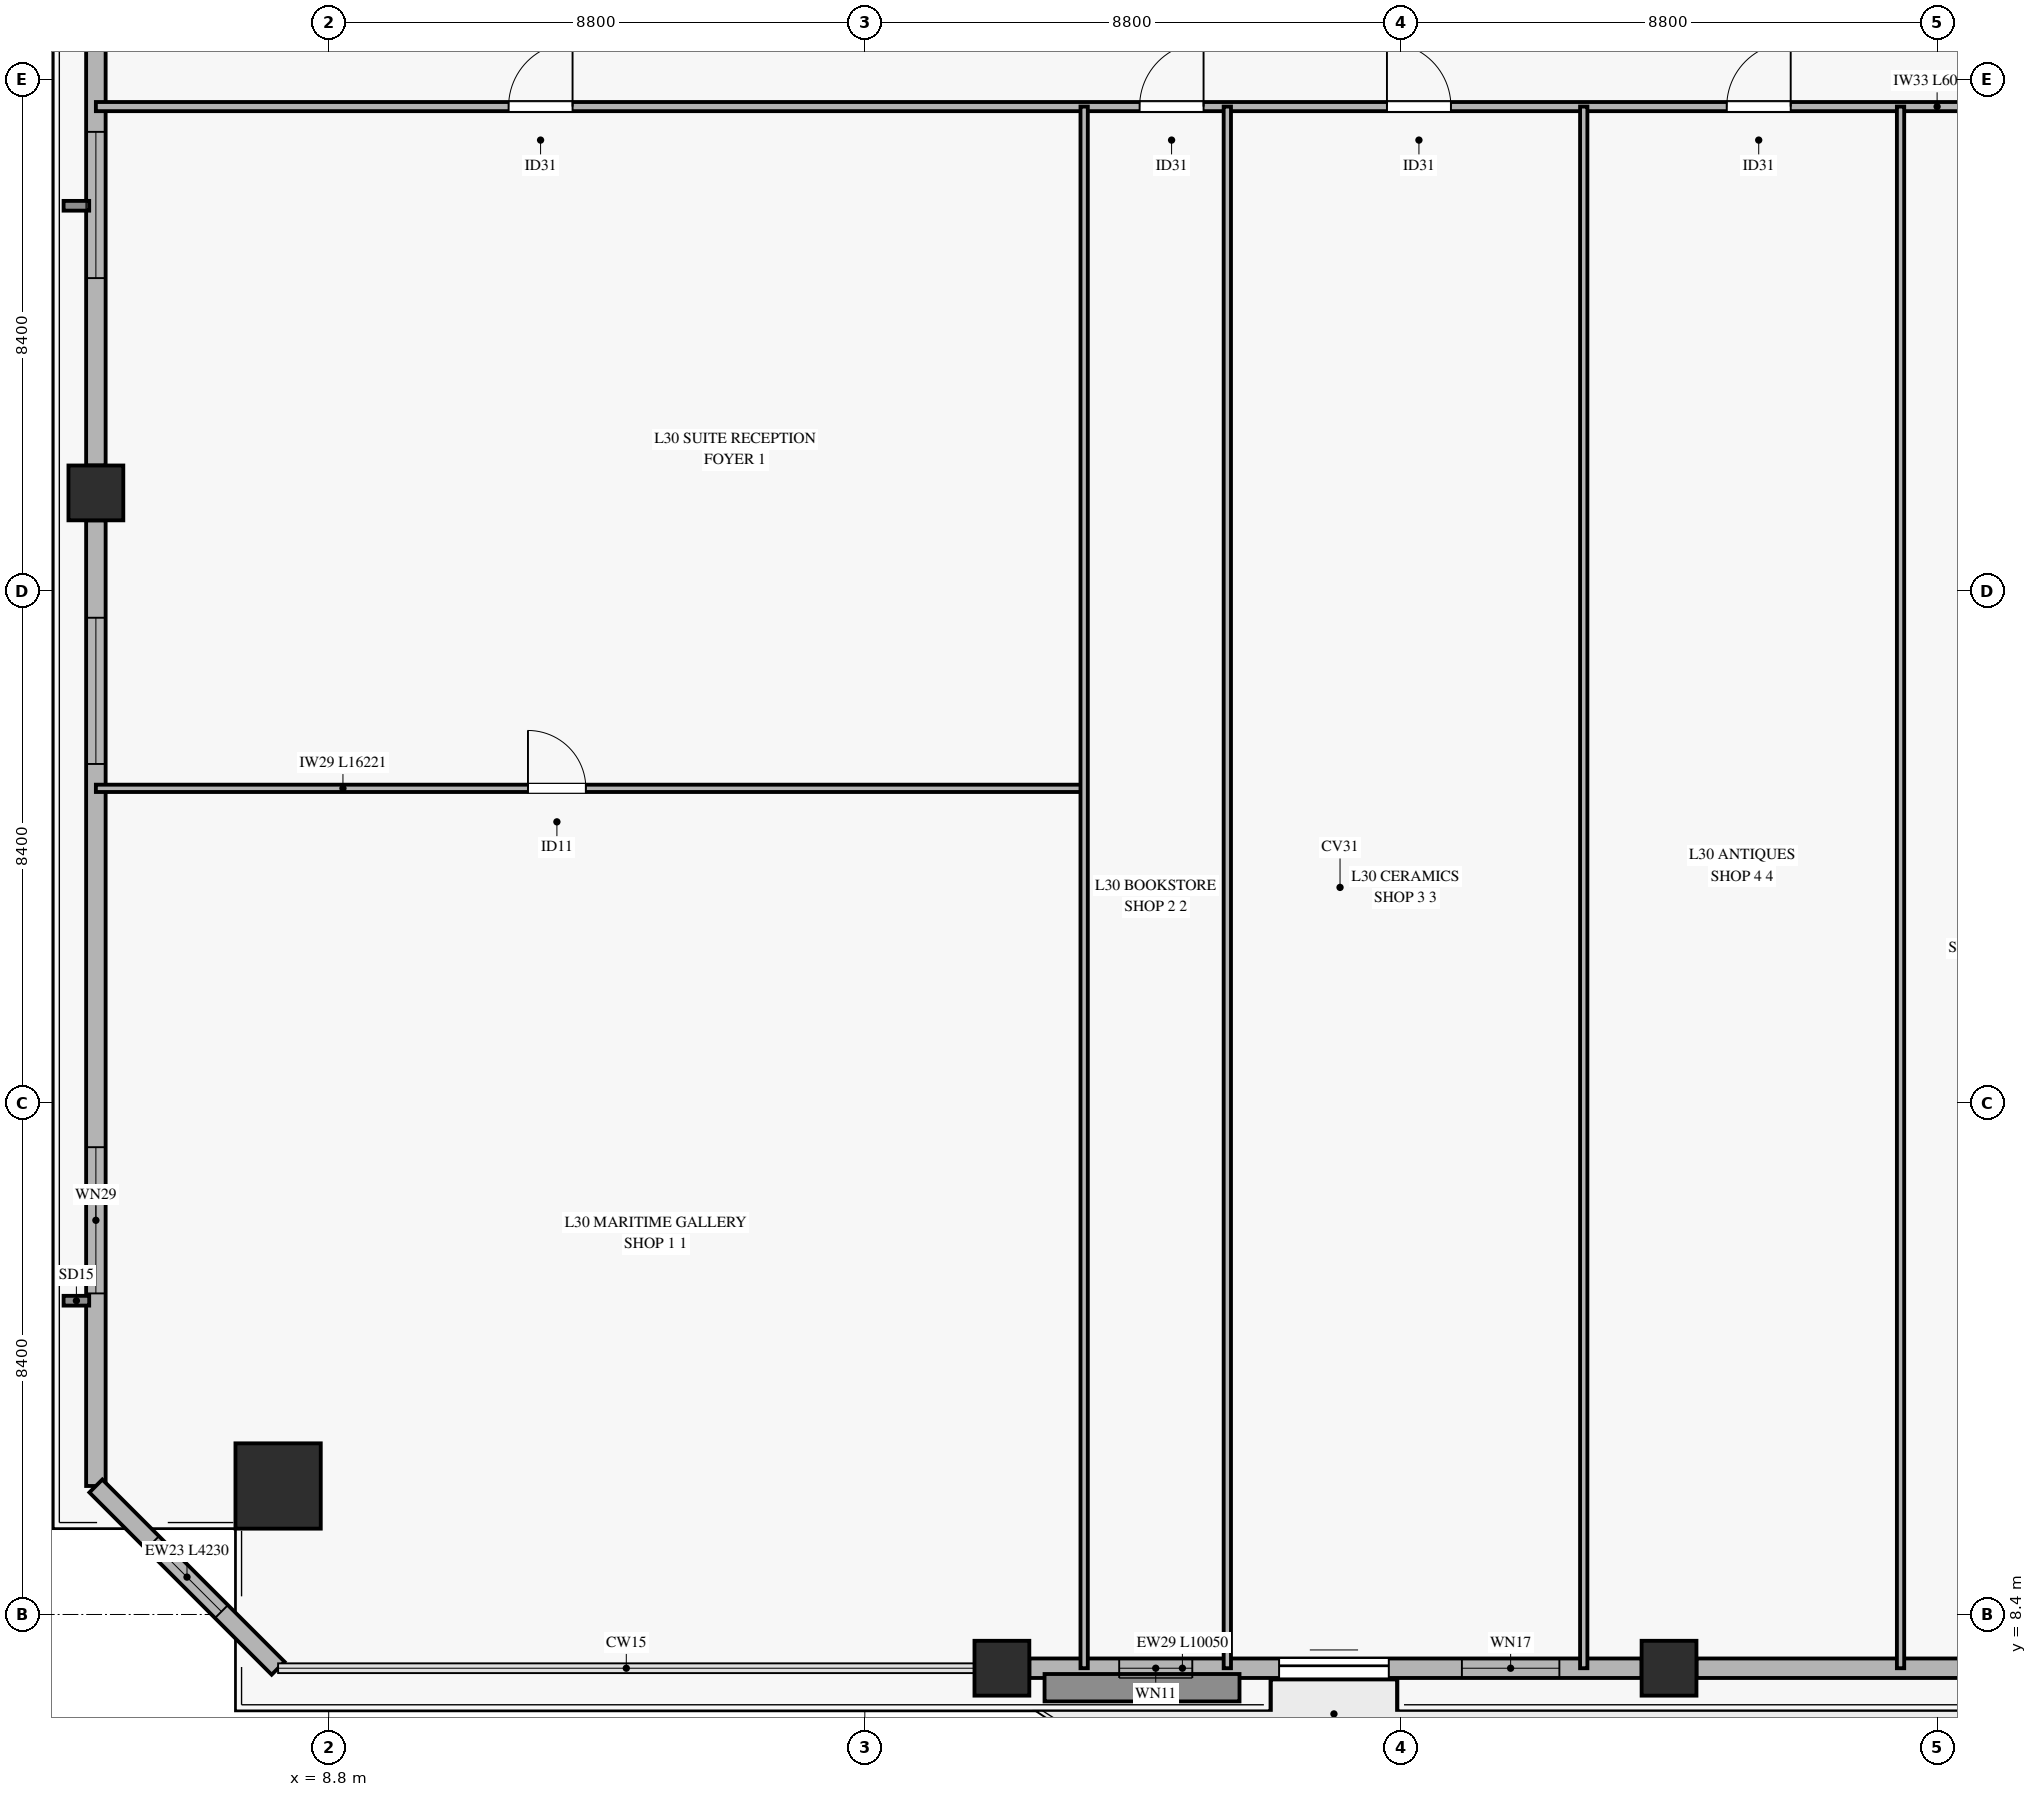
"""IFC4 building model, lengths in metres.
Left out: names, types, materials, properties, quantities, classifications, styles, units other than length and angle.
Written with IfcOpenShell. Run it as: python <this file> out.ifc"""

import sys

from ifc_helpers import new_model, si_unit, direction, frame, frame_2d, origin, origin_2d, place, context, subcontext, project, spatial, rectangle, hollow_rectangle, extrude, source, transform, mapped, element, fill, save


model = new_model("IFC4")
c1 = context("Model", 3, precision=1e-05, world=origin(), true_north=direction((0.0, 1.0)))
c2 = subcontext(c1, "Body", "Model", "MODEL_VIEW")
j1 = project(units=[si_unit("LENGTHUNIT", "METRE"), si_unit("PLANEANGLEUNIT", "RADIAN")], contexts=[c1])
p1 = place(None, origin())
s1 = spatial("IfcSite", under=j1, at=p1, CompositionType="ELEMENT")
p2 = place(p1, origin())
s2 = spatial("IfcBuilding", under=s1, at=p2, CompositionType="ELEMENT")
p3 = place(p2, frame((0.0, 0.0, 123.1)))
s3 = spatial("IfcBuildingStorey", under=s2, at=p3, CompositionType="ELEMENT", Elevation=123.1)
m1 = source(origin(), c2, "Body", "SweptSolid", [
    extrude(hollow_rectangle(XDim=1.4, YDim=1.4, WallThickness=0.065, at=origin_2d()), origin(), (0.0, 0.0, 1.0), 3.68),
])
p4 = place(p3, frame((7.97, 10.509, 0.0), z_axis=(0.0, 0.0, 1.0), x_axis=(1.0, 0.0, 0.0)))
e1 = element("IfcColumn", 1, at=p4, inside=s3, PredefinedType="COLUMN", context=c2, shape_type="MappedRepresentation", body=[
    mapped(m1, transform((0.0, 0.0, 0.0), x_axis=(1.0, 0.0, 0.0), y_axis=(0.0, 1.0, 0.0), z_axis=(0.0, 0.0, 1.0), scale=1.0)),
])
m2 = source(origin(), c2, "Body", "SweptSolid", [
    extrude(hollow_rectangle(XDim=0.9, YDim=0.9, WallThickness=0.04, at=origin_2d()), origin(), (0.0, 0.0, 1.0), 3.68),
])
for number, where, z_axis, x_axis in (
    (2, (19.85, 7.518, 0.0), (0.0, 0.0, 1.0), (1.0, 0.0, 0.0)),
    (3, (30.8, 7.518, 0.0), (0.0, 0.0, 1.0), (1.0, 0.0, 0.0)),
    (4, (4.979, 26.809, 0.0), (0.0, 0.0, 1.0), (1.0, 0.0, 0.0)),
):
    element("IfcColumn", number, at=place(p3, frame(where, z_axis=z_axis, x_axis=x_axis)), inside=s3, PredefinedType="COLUMN", context=c2, shape_type="MappedRepresentation", body=[
        mapped(m2, transform((0.0, 0.0, 0.0), x_axis=(1.0, 0.0, 0.0), y_axis=(0.0, 1.0, 0.0), z_axis=(0.0, 0.0, 1.0), scale=1.0)),
    ])
p5 = place(p3, frame((20.3, 7.518, 0.0), z_axis=(0.0, 0.0, 1.0), x_axis=(1.0, 0.0, 0.0)))
e5 = element("IfcWall", 5, at=p5, inside=s3, PredefinedType="SOLIDWALL", context=c2, shape_type="SweptSolid", body=[
    extrude(rectangle(XDim=10.05, YDim=0.32, at=frame_2d((5.025, 0.0))), origin(), (0.0, 0.0, 1.0), 3.16),
])
p6 = place(p5, frame((4.1, 0.0, 0.0)))
e6 = element("IfcOpeningElement", 6, at=p6, cuts=e5, PredefinedType="OPENING", context=c2, shape_type="SweptSolid", body=[
    extrude(rectangle(XDim=1.8, YDim=2.25, at=frame_2d((0.9, 1.125))), frame((0.0, 0.17, 0.0), z_axis=(0.0, -1.0, 0.0), x_axis=(1.0, 0.0, 0.0)), (0.0, 0.0, 1.0), 0.34),
])
p7 = place(p5, frame((1.475, 0.0, 0.45)))
e7 = element("IfcOpeningElement", 7, at=p7, cuts=e5, PredefinedType="OPENING", context=c2, shape_type="SweptSolid", body=[
    extrude(rectangle(XDim=1.2, YDim=2.0, at=frame_2d((0.6, 1.0))), frame((0.0, 0.17, 0.0), z_axis=(0.0, -1.0, 0.0), x_axis=(1.0, 0.0, 0.0)), (0.0, 0.0, 1.0), 0.34),
])
p8 = place(p5, frame((7.1, 0.0, 0.45)))
e8 = element("IfcOpeningElement", 8, at=p8, cuts=e5, PredefinedType="OPENING", context=c2, shape_type="SweptSolid", body=[
    extrude(rectangle(XDim=1.6, YDim=2.0, at=frame_2d((0.8, 1.0))), frame((0.0, 0.17, 0.0), z_axis=(0.0, -1.0, 0.0), x_axis=(1.0, 0.0, 0.0)), (0.0, 0.0, 1.0), 0.34),
])
p9 = place(p3, frame((31.25, 7.518, 0.0), z_axis=(0.0, 0.0, 1.0), x_axis=(1.0, 0.0, 0.0)))
e9 = element("IfcWall", 9, at=p9, inside=s3, PredefinedType="SOLIDWALL", context=c2, shape_type="SweptSolid", body=[
    extrude(rectangle(XDim=5.85, YDim=0.32, at=frame_2d((2.925, 0.0))), origin(), (0.0, 0.0, 1.0), 3.16),
])
p10 = place(p3, frame((4.979, 10.509, 0.0), z_axis=(0.0, 0.0, 1.0), x_axis=(0.0, 1.0, 0.0)))
e10 = element("IfcWall", 10, at=p10, inside=s3, PredefinedType="SOLIDWALL", context=c2, shape_type="SweptSolid", body=[
    extrude(rectangle(XDim=15.85, YDim=0.32, at=frame_2d((7.925, 0.0))), origin(), (0.0, 0.0, 1.0), 3.16),
])
p11 = place(p10, frame((3.161, 0.0, 0.45)))
e11 = element("IfcOpeningElement", 11, at=p11, cuts=e10, PredefinedType="OPENING", context=c2, shape_type="SweptSolid", body=[
    extrude(rectangle(XDim=2.4, YDim=2.1, at=frame_2d((1.2, 1.05))), frame((0.0, 0.17, 0.0), z_axis=(0.0, -1.0, 0.0), x_axis=(1.0, 0.0, 0.0)), (0.0, 0.0, 1.0), 0.34),
])
p12 = place(p10, frame((11.851, 0.0, 0.45)))
e12 = element("IfcOpeningElement", 12, at=p12, cuts=e10, PredefinedType="OPENING", context=c2, shape_type="SweptSolid", body=[
    extrude(rectangle(XDim=2.4, YDim=2.1, at=frame_2d((1.2, 1.05))), frame((0.0, 0.17, 0.0), z_axis=(0.0, -1.0, 0.0), x_axis=(1.0, 0.0, 0.0)), (0.0, 0.0, 1.0), 0.34),
])
p13 = place(p3, frame((4.979, 27.259, 0.0), z_axis=(0.0, 0.0, 1.0), x_axis=(0.0, 1.0, 0.0)))
e13 = element("IfcWall", 13, at=p13, inside=s3, PredefinedType="SOLIDWALL", context=c2, shape_type="SweptSolid", body=[
    extrude(rectangle(XDim=15.85, YDim=0.32, at=frame_2d((7.925, 0.0))), origin(), (0.0, 0.0, 1.0), 3.16),
])
p14 = place(p13, frame((3.076, 0.0, 0.45)))
e14 = element("IfcOpeningElement", 14, at=p14, cuts=e13, PredefinedType="OPENING", context=c2, shape_type="SweptSolid", body=[
    extrude(rectangle(XDim=2.4, YDim=2.1, at=frame_2d((1.2, 1.05))), frame((0.0, 0.17, 0.0), z_axis=(0.0, -1.0, 0.0), x_axis=(1.0, 0.0, 0.0)), (0.0, 0.0, 1.0), 0.34),
])
p15 = place(p3, frame((4.979, 10.509, 0.0), z_axis=(0.0, 0.0, 1.0), x_axis=(0.707106781187, -0.707106781187, 0.0)))
e15 = element("IfcWall", 15, at=p15, inside=s3, PredefinedType="SOLIDWALL", context=c2, shape_type="SweptSolid", body=[
    extrude(rectangle(XDim=4.23, YDim=0.3, at=frame_2d((2.115, 0.0))), origin(), (0.0, 0.0, 1.0), 3.16),
])
p16 = place(p15, frame((1.315, 0.0, 0.45)))
e16 = element("IfcOpeningElement", 16, at=p16, cuts=e15, PredefinedType="OPENING", context=c2, shape_type="SweptSolid", body=[
    extrude(rectangle(XDim=1.6, YDim=2.0, at=frame_2d((0.8, 1.0))), frame((0.0, 0.16, 0.0), z_axis=(0.0, -1.0, 0.0), x_axis=(1.0, 0.0, 0.0)), (0.0, 0.0, 1.0), 0.32),
])
p17 = place(p3, frame((4.979, 33.15, 0.0), z_axis=(0.0, 0.0, 1.0), x_axis=(1.0, 0.0, 0.0)))
e17 = element("IfcWall", 17, at=p17, inside=s3, PredefinedType="PARTITIONING", context=c2, shape_type="SweptSolid", body=[
    extrude(rectangle(XDim=60.442, YDim=0.15, at=frame_2d((30.221, 0.0))), origin(), (0.0, 0.0, 1.0), 2.765),
])
p18 = place(p17, frame((6.774, 0.0, 0.0)))
e18 = element("IfcOpeningElement", 18, at=p18, cuts=e17, PredefinedType="OPENING", context=c2, shape_type="SweptSolid", body=[
    extrude(rectangle(XDim=1.05, YDim=2.15, at=frame_2d((0.525, 1.075))), frame((0.0, 0.085, 0.0), z_axis=(0.0, -1.0, 0.0), x_axis=(1.0, 0.0, 0.0)), (0.0, 0.0, 1.0), 0.17),
])
p19 = place(p17, frame((17.131, 0.0, 0.0)))
e19 = element("IfcOpeningElement", 19, at=p19, cuts=e17, PredefinedType="OPENING", context=c2, shape_type="SweptSolid", body=[
    extrude(rectangle(XDim=1.05, YDim=2.15, at=frame_2d((0.525, 1.075))), frame((0.0, 0.085, 0.0), z_axis=(0.0, -1.0, 0.0), x_axis=(1.0, 0.0, 0.0)), (0.0, 0.0, 1.0), 0.17),
])
p20 = place(p17, frame((21.191, 0.0, 0.0)))
e20 = element("IfcOpeningElement", 20, at=p20, cuts=e17, PredefinedType="OPENING", context=c2, shape_type="SweptSolid", body=[
    extrude(rectangle(XDim=1.05, YDim=2.15, at=frame_2d((0.525, 1.075))), frame((0.0, 0.085, 0.0), z_axis=(0.0, -1.0, 0.0), x_axis=(1.0, 0.0, 0.0)), (0.0, 0.0, 1.0), 0.17),
])
p21 = place(p17, frame((26.768, 0.0, 0.0)))
e21 = element("IfcOpeningElement", 21, at=p21, cuts=e17, PredefinedType="OPENING", context=c2, shape_type="SweptSolid", body=[
    extrude(rectangle(XDim=1.05, YDim=2.15, at=frame_2d((0.525, 1.075))), frame((0.0, 0.085, 0.0), z_axis=(0.0, -1.0, 0.0), x_axis=(1.0, 0.0, 0.0)), (0.0, 0.0, 1.0), 0.17),
])
p22 = place(p17, frame((31.968, 0.0, 0.0)))
e22 = element("IfcOpeningElement", 22, at=p22, cuts=e17, PredefinedType="OPENING", context=c2, shape_type="SweptSolid", body=[
    extrude(rectangle(XDim=1.05, YDim=2.15, at=frame_2d((0.525, 1.075))), frame((0.0, 0.085, 0.0), z_axis=(0.0, -1.0, 0.0), x_axis=(1.0, 0.0, 0.0)), (0.0, 0.0, 1.0), 0.17),
])
p23 = place(p17, frame((37.084, 0.0, 0.0)))
e23 = element("IfcOpeningElement", 23, at=p23, cuts=e17, PredefinedType="OPENING", context=c2, shape_type="SweptSolid", body=[
    extrude(rectangle(XDim=1.05, YDim=2.15, at=frame_2d((0.525, 1.075))), frame((0.0, 0.085, 0.0), z_axis=(0.0, -1.0, 0.0), x_axis=(1.0, 0.0, 0.0)), (0.0, 0.0, 1.0), 0.17),
])
p24 = place(p17, frame((41.832, 0.0, 0.0)))
e24 = element("IfcOpeningElement", 24, at=p24, cuts=e17, PredefinedType="OPENING", context=c2, shape_type="SweptSolid", body=[
    extrude(rectangle(XDim=1.05, YDim=2.15, at=frame_2d((0.525, 1.075))), frame((0.0, 0.085, 0.0), z_axis=(0.0, -1.0, 0.0), x_axis=(1.0, 0.0, 0.0)), (0.0, 0.0, 1.0), 0.17),
])
p25 = place(p17, frame((50.795, 0.0, 0.0)))
e25 = element("IfcOpeningElement", 25, at=p25, cuts=e17, PredefinedType="OPENING", context=c2, shape_type="SweptSolid", body=[
    extrude(rectangle(XDim=1.05, YDim=2.15, at=frame_2d((0.525, 1.075))), frame((0.0, 0.085, 0.0), z_axis=(0.0, -1.0, 0.0), x_axis=(1.0, 0.0, 0.0)), (0.0, 0.0, 1.0), 0.17),
])
p26 = place(p3, frame((4.979, 21.96, 0.0), z_axis=(0.0, 0.0, 1.0), x_axis=(1.0, 0.0, 0.0)))
e26 = element("IfcWall", 26, at=p26, inside=s3, PredefinedType="PARTITIONING", context=c2, shape_type="SweptSolid", body=[
    extrude(rectangle(XDim=16.221, YDim=0.12, at=frame_2d((8.11, 0.0))), origin(), (0.0, 0.0, 1.0), 2.765),
])
p27 = place(p26, frame((7.092, 0.0, 0.0)))
e27 = element("IfcOpeningElement", 27, at=p27, cuts=e26, PredefinedType="OPENING", context=c2, shape_type="SweptSolid", body=[
    extrude(rectangle(XDim=0.95, YDim=2.1, at=frame_2d((0.475, 1.05))), frame((0.0, 0.07, 0.0), z_axis=(0.0, -1.0, 0.0), x_axis=(1.0, 0.0, 0.0)), (0.0, 0.0, 1.0), 0.14),
])
for number, where, z_axis, x_axis in (
    (28, (21.2, 7.518, 0.0), (0.0, 0.0, 1.0), (0.0, 1.0, 0.0)),
    (29, (23.55, 7.518, 0.0), (0.0, 0.0, 1.0), (0.0, 1.0, 0.0)),
    (30, (29.4, 7.518, 0.0), (0.0, 0.0, 1.0), (0.0, 1.0, 0.0)),
    (31, (34.6, 7.518, 0.0), (0.0, 0.0, 1.0), (0.0, 1.0, 0.0)),
):
    element("IfcWall", number, at=place(p3, frame(where, z_axis=z_axis, x_axis=x_axis)), inside=s3, PredefinedType="PARTITIONING", context=c2, shape_type="SweptSolid", body=[
        extrude(rectangle(XDim=25.632, YDim=0.12, at=frame_2d((12.816, 0.0))), origin(), (0.0, 0.0, 1.0), 3.165),
    ])
m3 = source(origin(), c2, "Body", "SweptSolid", [
    extrude(rectangle(XDim=1.8, YDim=2.25, at=frame_2d((0.9, 1.125))), frame((0.0, 0.025, 0.0), z_axis=(0.0, -1.0, 0.0), x_axis=(1.0, 0.0, 0.0)), (0.0, 0.0, 1.0), 0.05),
])
p28 = place(p6, origin())
e32 = element("IfcDoor", 32, at=p28, inside=s3, OperationType="SLIDING_TO_LEFT", PredefinedType="DOOR", context=c2, shape_type="MappedRepresentation", body=[
    mapped(m3, transform((0.0, 0.0, 0.0), x_axis=(1.0, 0.0, 0.0), y_axis=(0.0, 1.0, 0.0), z_axis=(0.0, 0.0, 1.0), scale=1.0)),
])
fill(e6, e32)
m4 = source(origin(), c2, "Body", "SweptSolid", [
    extrude(rectangle(XDim=1.2, YDim=2.0, at=frame_2d((0.6, 1.0))), frame((0.0, 0.03, 0.0), z_axis=(0.0, -1.0, 0.0), x_axis=(1.0, 0.0, 0.0)), (0.0, 0.0, 1.0), 0.06),
])
p29 = place(p7, origin())
e33 = element("IfcWindow", 33, at=p29, inside=s3, PartitioningType="SINGLE_PANEL", PredefinedType="WINDOW", context=c2, shape_type="MappedRepresentation", body=[
    mapped(m4, transform((0.0, 0.0, 0.0), x_axis=(1.0, 0.0, 0.0), y_axis=(0.0, 1.0, 0.0), z_axis=(0.0, 0.0, 1.0), scale=1.0)),
])
fill(e7, e33)
m5 = source(origin(), c2, "Body", "SweptSolid", [
    extrude(rectangle(XDim=1.6, YDim=2.0, at=frame_2d((0.8, 1.0))), frame((0.0, 0.03, 0.0), z_axis=(0.0, -1.0, 0.0), x_axis=(1.0, 0.0, 0.0)), (0.0, 0.0, 1.0), 0.06),
])
p30 = place(p8, origin())
e34 = element("IfcWindow", 34, at=p30, inside=s3, PartitioningType="SINGLE_PANEL", PredefinedType="WINDOW", context=c2, shape_type="MappedRepresentation", body=[
    mapped(m5, transform((0.0, 0.0, 0.0), x_axis=(1.0, 0.0, 0.0), y_axis=(0.0, 1.0, 0.0), z_axis=(0.0, 0.0, 1.0), scale=1.0)),
])
fill(e8, e34)
m6 = source(origin(), c2, "Body", "SweptSolid", [
    extrude(rectangle(XDim=2.4, YDim=2.1, at=frame_2d((1.2, 1.05))), frame((0.0, 0.03, 0.0), z_axis=(0.0, -1.0, 0.0), x_axis=(1.0, 0.0, 0.0)), (0.0, 0.0, 1.0), 0.06),
])
p31 = place(p11, origin())
e35 = element("IfcWindow", 35, at=p31, inside=s3, PartitioningType="SINGLE_PANEL", PredefinedType="WINDOW", context=c2, shape_type="MappedRepresentation", body=[
    mapped(m6, transform((0.0, 0.0, 0.0), x_axis=(1.0, 0.0, 0.0), y_axis=(0.0, 1.0, 0.0), z_axis=(0.0, 0.0, 1.0), scale=1.0)),
])
fill(e11, e35)
p32 = place(p12, origin())
e36 = element("IfcWindow", 36, at=p32, inside=s3, PartitioningType="SINGLE_PANEL", PredefinedType="WINDOW", context=c2, shape_type="MappedRepresentation", body=[
    mapped(m6, transform((0.0, 0.0, 0.0), x_axis=(1.0, 0.0, 0.0), y_axis=(0.0, 1.0, 0.0), z_axis=(0.0, 0.0, 1.0), scale=1.0)),
])
fill(e12, e36)
p33 = place(p14, origin())
e37 = element("IfcWindow", 37, at=p33, inside=s3, PartitioningType="SINGLE_PANEL", PredefinedType="WINDOW", context=c2, shape_type="MappedRepresentation", body=[
    mapped(m6, transform((0.0, 0.0, 0.0), x_axis=(1.0, 0.0, 0.0), y_axis=(0.0, 1.0, 0.0), z_axis=(0.0, 0.0, 1.0), scale=1.0)),
])
fill(e14, e37)
p34 = place(p16, origin())
e38 = element("IfcWindow", 38, at=p34, inside=s3, PartitioningType="SINGLE_PANEL", PredefinedType="WINDOW", context=c2, shape_type="MappedRepresentation", body=[
    mapped(m5, transform((0.0, 0.0, 0.0), x_axis=(1.0, 0.0, 0.0), y_axis=(0.0, 1.0, 0.0), z_axis=(0.0, 0.0, 1.0), scale=1.0)),
])
fill(e16, e38)
m7 = source(origin(), c2, "Body", "SweptSolid", [
    extrude(rectangle(XDim=1.05, YDim=2.15, at=frame_2d((0.525, 1.075))), frame((0.0, 0.025, 0.0), z_axis=(0.0, -1.0, 0.0), x_axis=(1.0, 0.0, 0.0)), (0.0, 0.0, 1.0), 0.05),
])
p35 = place(p18, origin())
e39 = element("IfcDoor", 39, at=p35, inside=s3, OperationType="SINGLE_SWING_RIGHT", PredefinedType="DOOR", context=c2, shape_type="MappedRepresentation", body=[
    mapped(m7, transform((0.0, 0.0, 0.0), x_axis=(1.0, 0.0, 0.0), y_axis=(0.0, 1.0, 0.0), z_axis=(0.0, 0.0, 1.0), scale=1.0)),
])
fill(e18, e39)
m8 = source(origin(), c2, "Body", "SweptSolid", [
    extrude(rectangle(XDim=0.95, YDim=2.1, at=frame_2d((0.475, 1.05))), frame((0.0, 0.025, 0.0), z_axis=(0.0, -1.0, 0.0), x_axis=(1.0, 0.0, 0.0)), (0.0, 0.0, 1.0), 0.05),
])
p36 = place(p27, origin())
e40 = element("IfcDoor", 40, at=p36, inside=s3, OperationType="SINGLE_SWING_LEFT", PredefinedType="DOOR", context=c2, shape_type="MappedRepresentation", body=[
    mapped(m8, transform((0.0, 0.0, 0.0), x_axis=(1.0, 0.0, 0.0), y_axis=(0.0, 1.0, 0.0), z_axis=(0.0, 0.0, 1.0), scale=1.0)),
])
fill(e27, e40)
p37 = place(p19, origin())
e41 = element("IfcDoor", 41, at=p37, inside=s3, OperationType="SINGLE_SWING_RIGHT", PredefinedType="DOOR", context=c2, shape_type="MappedRepresentation", body=[
    mapped(m7, transform((0.0, 0.0, 0.0), x_axis=(1.0, 0.0, 0.0), y_axis=(0.0, 1.0, 0.0), z_axis=(0.0, 0.0, 1.0), scale=1.0)),
])
fill(e19, e41)
p38 = place(p20, origin())
e42 = element("IfcDoor", 42, at=p38, inside=s3, OperationType="SINGLE_SWING_LEFT", PredefinedType="DOOR", context=c2, shape_type="MappedRepresentation", body=[
    mapped(m7, transform((0.0, 0.0, 0.0), x_axis=(1.0, 0.0, 0.0), y_axis=(0.0, 1.0, 0.0), z_axis=(0.0, 0.0, 1.0), scale=1.0)),
])
fill(e20, e42)
p39 = place(p21, origin())
e43 = element("IfcDoor", 43, at=p39, inside=s3, OperationType="SINGLE_SWING_RIGHT", PredefinedType="DOOR", context=c2, shape_type="MappedRepresentation", body=[
    mapped(m7, transform((0.0, 0.0, 0.0), x_axis=(1.0, 0.0, 0.0), y_axis=(0.0, 1.0, 0.0), z_axis=(0.0, 0.0, 1.0), scale=1.0)),
])
fill(e21, e43)
save(model, sys.argv[1])
